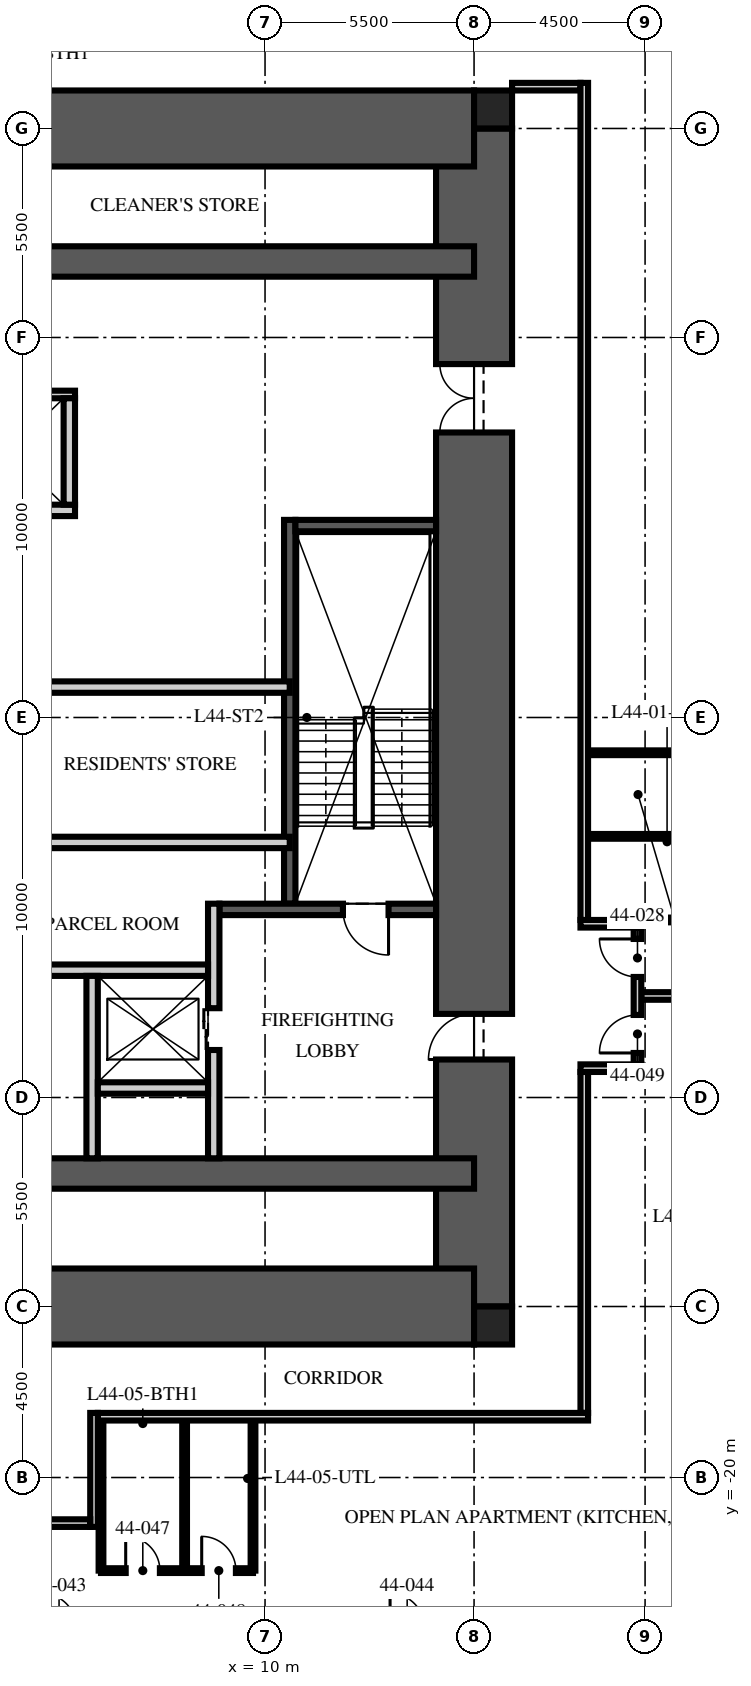
"""IFC4 building model, lengths in metres.
Left out: names, types, materials, properties, quantities, classifications, styles, units other than length and angle.
Written with IfcOpenShell. Run it as: python <this file> out.ifc"""

import sys

from ifc_helpers import new_model, si_unit, direction, frame, frame_2d, origin, origin_2d, place, context, subcontext, project, spatial, rectangle, extrude, element, fill, save


model = new_model("IFC4")
c1 = context("Model", 3, precision=1e-05, world=origin(), true_north=direction((0.0, 1.0)))
c2 = subcontext(c1, "Body", "Model", "MODEL_VIEW")
j1 = project(units=[si_unit("LENGTHUNIT", "METRE"), si_unit("PLANEANGLEUNIT", "RADIAN")], contexts=[c1])
p1 = place(None, origin())
s1 = spatial("IfcSite", under=j1, at=p1, CompositionType="ELEMENT")
p2 = place(p1, origin())
s2 = spatial("IfcBuilding", under=s1, at=p2, CompositionType="ELEMENT")
p3 = place(p2, frame((0.0, 0.0, 174.75)))
s3 = spatial("IfcBuildingStorey", under=s2, at=p3, CompositionType="ELEMENT", Elevation=174.75)
p4 = place(p3, frame((15.5, -15.5, -0.25), z_axis=(0.0, 0.0, 1.0), x_axis=(0.0, 1.0, 0.0)))
e1 = element("IfcWall", 1, at=p4, inside=s3, PredefinedType="SHEAR", context=c2, shape_type="SweptSolid", body=[
    extrude(rectangle(XDim=31.0, YDim=2.0, at=frame_2d((15.5, 0.0))), origin(), (0.0, 0.0, 1.0), 3.75),
])
p5 = place(p4, frame((6.5, 0.0, 0.25)))
e2 = element("IfcOpeningElement", 2, at=p5, cuts=e1, PredefinedType="OPENING", context=c2, shape_type="SweptSolid", body=[
    extrude(rectangle(XDim=1.2, YDim=2.1, at=frame_2d((0.6, 1.05))), frame((0.0, 1.01, 0.0), z_axis=(0.0, -1.0, 0.0), x_axis=(1.0, 0.0, 0.0)), (0.0, 0.0, 1.0), 2.02),
])
p6 = place(p4, frame((23.0, 0.0, 0.25)))
e3 = element("IfcOpeningElement", 3, at=p6, cuts=e1, PredefinedType="OPENING", context=c2, shape_type="SweptSolid", body=[
    extrude(rectangle(XDim=1.8, YDim=2.1, at=frame_2d((0.9, 1.05))), frame((0.0, 1.01, 0.0), z_axis=(0.0, -1.0, 0.0), x_axis=(1.0, 0.0, 0.0)), (0.0, 0.0, 1.0), 2.02),
])
p7 = place(p3, frame((-15.5, 15.5, -0.25), z_axis=(0.0, 0.0, 1.0), x_axis=(1.0, 0.0, 0.0)))
e4 = element("IfcWall", 4, at=p7, inside=s3, PredefinedType="SHEAR", context=c2, shape_type="SweptSolid", body=[
    extrude(rectangle(XDim=31.0, YDim=2.0, at=frame_2d((15.5, 0.0))), origin(), (0.0, 0.0, 1.0), 3.75),
])
p8 = place(p7, frame((5.0, 0.0, 0.25)))
e5 = element("IfcOpeningElement", 5, at=p8, cuts=e4, PredefinedType="OPENING", context=c2, shape_type="SweptSolid", body=[
    extrude(rectangle(XDim=1.0, YDim=2.1, at=frame_2d((0.5, 1.05))), frame((0.0, 1.01, 0.0), z_axis=(0.0, -1.0, 0.0), x_axis=(1.0, 0.0, 0.0)), (0.0, 0.0, 1.0), 2.02),
])
p9 = place(p3, frame((-15.5, -15.5, -0.25), z_axis=(0.0, 0.0, 1.0), x_axis=(1.0, 0.0, 0.0)))
e6 = element("IfcWall", 6, at=p9, inside=s3, PredefinedType="SHEAR", context=c2, shape_type="SweptSolid", body=[
    extrude(rectangle(XDim=31.0, YDim=2.0, at=frame_2d((15.5, 0.0))), origin(), (0.0, 0.0, 1.0), 3.75),
])
p10 = place(p9, frame((10.4, 0.0, 0.25)))
e7 = element("IfcOpeningElement", 7, at=p10, cuts=e6, PredefinedType="OPENING", context=c2, shape_type="SweptSolid", body=[
    extrude(rectangle(XDim=1.1, YDim=2.1, at=frame_2d((0.55, 1.05))), frame((0.0, 1.01, 0.0), z_axis=(0.0, -1.0, 0.0), x_axis=(1.0, 0.0, 0.0)), (0.0, 0.0, 1.0), 2.02),
])
p11 = place(p9, frame((13.5, 0.0, 0.25)))
e8 = element("IfcOpeningElement", 8, at=p11, cuts=e6, PredefinedType="OPENING", context=c2, shape_type="SweptSolid", body=[
    extrude(rectangle(XDim=1.1, YDim=2.1, at=frame_2d((0.55, 1.05))), frame((0.0, 1.01, 0.0), z_axis=(0.0, -1.0, 0.0), x_axis=(1.0, 0.0, 0.0)), (0.0, 0.0, 1.0), 2.02),
])
p12 = place(p9, frame((16.6, 0.0, 0.25)))
e9 = element("IfcOpeningElement", 9, at=p12, cuts=e6, PredefinedType="OPENING", context=c2, shape_type="SweptSolid", body=[
    extrude(rectangle(XDim=1.1, YDim=2.1, at=frame_2d((0.55, 1.05))), frame((0.0, 1.01, 0.0), z_axis=(0.0, -1.0, 0.0), x_axis=(1.0, 0.0, 0.0)), (0.0, 0.0, 1.0), 2.02),
])
for number, where, z_axis, x_axis in (
    (10, (-15.5, 12.0, -0.25), (0.0, 0.0, 1.0), (1.0, 0.0, 0.0)),
    (11, (-15.5, -12.0, -0.25), (0.0, 0.0, 1.0), (1.0, 0.0, 0.0)),
):
    element("IfcWall", number, at=place(p3, frame(where, z_axis=z_axis, x_axis=x_axis)), inside=s3, PredefinedType="SHEAR", context=c2, shape_type="SweptSolid", body=[
        extrude(rectangle(XDim=31.0, YDim=0.8, at=frame_2d((15.5, 0.0))), origin(), (0.0, 0.0, 1.0), 3.75),
    ])
for number, where, z_axis, x_axis in (
    (12, (16.0, 16.0, -0.25), (0.0, 0.0, 1.0), (1.0, 0.0, 0.0)),
    (13, (16.0, -16.0, -0.25), (0.0, 0.0, 1.0), (1.0, 0.0, 0.0)),
):
    element("IfcColumn", number, at=place(p3, frame(where, z_axis=z_axis, x_axis=x_axis)), inside=s3, PredefinedType="COLUMN", context=c2, shape_type="SweptSolid", body=[
        extrude(rectangle(XDim=1.0, YDim=1.0, at=origin_2d()), origin(), (0.0, 0.0, 1.0), 3.75),
    ])
p13 = place(p3, frame((10.65, -4.9, 0.0), z_axis=(0.0, 0.0, 1.0), x_axis=(0.0, 1.0, 0.0)))
e14 = element("IfcWall", 14, at=p13, inside=s3, PredefinedType="SOLIDWALL", context=c2, shape_type="SweptSolid", body=[
    extrude(rectangle(XDim=10.1, YDim=0.3, at=frame_2d((5.05, 0.0))), origin(), (0.0, 0.0, 1.0), 3.5),
])
p14 = place(p3, frame((14.5, -5.05, 0.0), z_axis=(0.0, 0.0, 1.0), x_axis=(-1.0, 0.0, 0.0)))
e15 = element("IfcWall", 15, at=p14, inside=s3, PredefinedType="SOLIDWALL", context=c2, shape_type="SweptSolid", body=[
    extrude(rectangle(XDim=5.7, YDim=0.3, at=frame_2d((2.85, 0.0))), origin(), (0.0, 0.0, 1.0), 3.5),
])
p15 = place(p14, frame((1.25, 0.0, 0.0)))
e16 = element("IfcOpeningElement", 16, at=p15, cuts=e15, PredefinedType="OPENING", context=c2, shape_type="SweptSolid", body=[
    extrude(rectangle(XDim=1.2, YDim=2.1, at=frame_2d((0.6, 1.05))), frame((0.0, 0.16, 0.0), z_axis=(0.0, -1.0, 0.0), x_axis=(1.0, 0.0, 0.0)), (0.0, 0.0, 1.0), 0.32),
])
p16 = place(p3, frame((14.5, 5.05, 0.0), z_axis=(0.0, 0.0, 1.0), x_axis=(-1.0, 0.0, 0.0)))
e17 = element("IfcWall", 17, at=p16, inside=s3, PredefinedType="SOLIDWALL", context=c2, shape_type="SweptSolid", body=[
    extrude(rectangle(XDim=3.7, YDim=0.3, at=frame_2d((1.85, 0.0))), origin(), (0.0, 0.0, 1.0), 3.5),
])
p17 = place(p3, frame((8.65, -11.6, 0.0), z_axis=(0.0, 0.0, 1.0), x_axis=(0.0, 1.0, 0.0)))
e18 = element("IfcWall", 18, at=p17, inside=s3, PredefinedType="PARTITIONING", context=c2, shape_type="SweptSolid", body=[
    extrude(rectangle(XDim=6.7, YDim=0.3, at=frame_2d((3.35, 0.0))), origin(), (0.0, 0.0, 1.0), 3.5),
])
p18 = place(p17, frame((2.85, 0.0, 0.0)))
e19 = element("IfcOpeningElement", 19, at=p18, cuts=e18, PredefinedType="OPENING", context=c2, shape_type="SweptSolid", body=[
    extrude(rectangle(XDim=1.1, YDim=2.1, at=frame_2d((0.55, 1.05))), frame((0.0, 0.16, 0.0), z_axis=(0.0, -1.0, 0.0), x_axis=(1.0, 0.0, 0.0)), (0.0, 0.0, 1.0), 0.32),
])
p19 = place(p3, frame((-8.5, -6.65, 0.0), z_axis=(0.0, 0.0, 1.0), x_axis=(1.0, 0.0, 0.0)))
e20 = element("IfcWall", 20, at=p19, inside=s3, PredefinedType="PARTITIONING", context=c2, shape_type="SweptSolid", body=[
    extrude(rectangle(XDim=17.0, YDim=0.3, at=frame_2d((8.5, 0.0))), origin(), (0.0, 0.0, 1.0), 3.5),
])
p20 = place(p19, frame((7.8, 0.0, 0.0)))
e21 = element("IfcOpeningElement", 21, at=p20, cuts=e20, PredefinedType="OPENING", context=c2, shape_type="SweptSolid", body=[
    extrude(rectangle(XDim=1.3, YDim=2.4, at=frame_2d((0.65, 1.2))), frame((0.0, 0.16, 0.0), z_axis=(0.0, -1.0, 0.0), x_axis=(1.0, 0.0, 0.0)), (0.0, 0.0, 1.0), 0.32),
])
p21 = place(p19, frame((5.65, 0.0, 0.0)))
e22 = element("IfcOpeningElement", 22, at=p21, cuts=e20, PredefinedType="OPENING", context=c2, shape_type="SweptSolid", body=[
    extrude(rectangle(XDim=0.9, YDim=2.1, at=frame_2d((0.45, 1.05))), frame((0.0, 0.16, 0.0), z_axis=(0.0, -1.0, 0.0), x_axis=(1.0, 0.0, 0.0)), (0.0, 0.0, 1.0), 0.32),
])
p22 = place(p19, frame((10.4, 0.0, 0.0)))
e23 = element("IfcOpeningElement", 23, at=p22, cuts=e20, PredefinedType="OPENING", context=c2, shape_type="SweptSolid", body=[
    extrude(rectangle(XDim=0.9, YDim=2.1, at=frame_2d((0.45, 1.05))), frame((0.0, 0.16, 0.0), z_axis=(0.0, -1.0, 0.0), x_axis=(1.0, 0.0, 0.0)), (0.0, 0.0, 1.0), 0.32),
])
p23 = place(p3, frame((5.45, -11.6, 0.0), z_axis=(0.0, 0.0, 1.0), x_axis=(0.0, 1.0, 0.0)))
e24 = element("IfcWall", 24, at=p23, inside=s3, PredefinedType="PARTITIONING", context=c2, shape_type="SweptSolid", body=[
    extrude(rectangle(XDim=4.8, YDim=0.3, at=frame_2d((2.4, 0.0))), origin(), (0.0, 0.0, 1.0), 3.5),
])
p24 = place(p3, frame((5.6, -9.75, 0.0), z_axis=(0.0, 0.0, 1.0), x_axis=(1.0, 0.0, 0.0)))
e25 = element("IfcWall", 25, at=p24, inside=s3, PredefinedType="PARTITIONING", context=c2, shape_type="SweptSolid", body=[
    extrude(rectangle(XDim=2.9, YDim=0.3, at=frame_2d((1.45, 0.0))), origin(), (0.0, 0.0, 1.0), 3.5),
])
p25 = place(p3, frame((-4.7, 5.45, 0.0), z_axis=(0.0, 0.0, 1.0), x_axis=(1.0, 0.0, 0.0)))
e26 = element("IfcWall", 26, at=p25, inside=s3, PredefinedType="PARTITIONING", context=c2, shape_type="SweptSolid", body=[
    extrude(rectangle(XDim=9.7, YDim=0.3, at=frame_2d((4.85, 0.0))), origin(), (0.0, 0.0, 1.0), 3.5),
])
p26 = place(p3, frame((-4.7, 8.5, 0.0), z_axis=(0.0, 0.0, 1.0), x_axis=(1.0, 0.0, 0.0)))
e27 = element("IfcWall", 27, at=p26, inside=s3, PredefinedType="PARTITIONING", context=c2, shape_type="SweptSolid", body=[
    extrude(rectangle(XDim=9.7, YDim=0.2, at=frame_2d((4.85, 0.0))), origin(), (0.0, 0.0, 1.0), 3.5),
])
p27 = place(p3, frame((4.85, 5.6, 0.0), z_axis=(0.0, 0.0, 1.0), x_axis=(0.0, 1.0, 0.0)))
e28 = element("IfcWall", 28, at=p27, inside=s3, PredefinedType="PARTITIONING", context=c2, shape_type="SweptSolid", body=[
    extrude(rectangle(XDim=2.8, YDim=0.3, at=frame_2d((1.4, 0.0))), origin(), (0.0, 0.0, 1.0), 3.5),
])
p28 = place(p3, frame((-10.65, 0.8, 0.0), z_axis=(0.0, 0.0, 1.0), x_axis=(1.0, 0.0, 0.0)))
e29 = element("IfcWall", 29, at=p28, inside=s3, PredefinedType="PARTITIONING", context=c2, shape_type="SweptSolid", body=[
    extrude(rectangle(XDim=21.3, YDim=0.3, at=frame_2d((10.65, 0.0))), origin(), (0.0, 0.0, 1.0), 3.5),
])
p29 = place(p28, frame((10.05, 0.0, 0.0)))
e30 = element("IfcOpeningElement", 30, at=p29, cuts=e29, PredefinedType="OPENING", context=c2, shape_type="SweptSolid", body=[
    extrude(rectangle(XDim=1.2, YDim=2.1, at=frame_2d((0.6, 1.05))), frame((0.0, 0.16, 0.0), z_axis=(0.0, -1.0, 0.0), x_axis=(1.0, 0.0, 0.0)), (0.0, 0.0, 1.0), 0.32),
])
p30 = place(p28, frame((1.74, 0.0, 0.0)))
e31 = element("IfcOpeningElement", 31, at=p30, cuts=e29, PredefinedType="OPENING", context=c2, shape_type="SweptSolid", body=[
    extrude(rectangle(XDim=0.9, YDim=2.1, at=frame_2d((0.45, 1.05))), frame((0.0, 0.16, 0.0), z_axis=(0.0, -1.0, 0.0), x_axis=(1.0, 0.0, 0.0)), (0.0, 0.0, 1.0), 0.32),
])
p31 = place(p3, frame((10.65, -3.288, 0.0), z_axis=(0.0, 0.0, 1.0), x_axis=(-1.0, 0.0, 0.0)))
e32 = element("IfcWall", 32, at=p31, inside=s3, PredefinedType="PARTITIONING", context=c2, shape_type="SweptSolid", body=[
    extrude(rectangle(XDim=7.35, YDim=0.3, at=frame_2d((3.675, 0.0))), origin(), (0.0, 0.0, 1.0), 3.5),
])
p32 = place(p3, frame((16.5, 16.6, 0.0), z_axis=(0.0, 0.0, 1.0), x_axis=(1.0, 0.0, 0.0)))
e33 = element("IfcWall", 33, at=p32, inside=s3, PredefinedType="PARTITIONING", context=c2, shape_type="SweptSolid", body=[
    extrude(rectangle(XDim=1.8, YDim=0.2, at=frame_2d((0.9, 0.0))), origin(), (0.0, 0.0, 1.0), 2.3),
])
p33 = place(p3, frame((19.9, -7.328, 0.0), z_axis=(0.0, 0.0, 1.0), x_axis=(1.0, 0.0, 0.0)))
e34 = element("IfcWall", 34, at=p33, inside=s3, PredefinedType="PARTITIONING", context=c2, shape_type="SweptSolid", body=[
    extrude(rectangle(XDim=8.25, YDim=0.2, at=frame_2d((4.125, 0.0))), origin(), (0.0, 0.0, 1.0), 2.81),
])
p34 = place(p3, frame((19.97, -5.328, 0.0), z_axis=(0.0, 0.0, 1.0), x_axis=(1.0, 0.0, 0.0)))
e35 = element("IfcWall", 35, at=p34, inside=s3, PredefinedType="PARTITIONING", context=c2, shape_type="SweptSolid", body=[
    extrude(rectangle(XDim=2.06, YDim=0.125, at=frame_2d((1.03, 0.0))), origin(), (0.0, 0.0, 1.0), 3.5),
])
for number, where, z_axis, x_axis in (
    (36, (18.5, -3.128, 0.0), (0.0, 0.0, 1.0), (1.0, 0.0, 0.0)),
    (37, (18.5, -0.928, 0.0), (0.0, 0.0, 1.0), (1.0, 0.0, 0.0)),
):
    element("IfcWall", number, at=place(p3, frame(where, z_axis=z_axis, x_axis=x_axis)), inside=s3, PredefinedType="PARTITIONING", context=c2, shape_type="SweptSolid", body=[
        extrude(rectangle(XDim=3.53, YDim=0.125, at=frame_2d((1.765, 0.0))), origin(), (0.0, 0.0, 1.0), 3.5),
    ])
p35 = place(p3, frame((5.684, -22.45, 0.0), z_axis=(0.0, 0.0, 1.0), x_axis=(1.0, 0.0, 0.0)))
e38 = element("IfcWall", 38, at=p35, inside=s3, PredefinedType="PARTITIONING", context=c2, shape_type="SweptSolid", body=[
    extrude(rectangle(XDim=4.0, YDim=0.125, at=frame_2d((2.0, 0.0))), origin(), (0.0, 0.0, 1.0), 2.7),
])
p36 = place(p35, frame((0.65, 0.0, 0.0)))
e39 = element("IfcOpeningElement", 39, at=p36, cuts=e38, PredefinedType="OPENING", context=c2, shape_type="SweptSolid", body=[
    extrude(rectangle(XDim=0.9, YDim=2.1, at=frame_2d((0.45, 1.05))), frame((0.0, 0.073, 0.0), z_axis=(0.0, -1.0, 0.0), x_axis=(1.0, 0.0, 0.0)), (0.0, 0.0, 1.0), 0.145),
])
p37 = place(p35, frame((2.65, 0.0, 0.0)))
e40 = element("IfcOpeningElement", 40, at=p37, cuts=e38, PredefinedType="OPENING", context=c2, shape_type="SweptSolid", body=[
    extrude(rectangle(XDim=0.9, YDim=2.1, at=frame_2d((0.45, 1.05))), frame((0.0, 0.073, 0.0), z_axis=(0.0, -1.0, 0.0), x_axis=(1.0, 0.0, 0.0)), (0.0, 0.0, 1.0), 0.145),
])
for number, where, z_axis, x_axis in (
    (41, (5.684, -18.5, 0.0), (0.0, 0.0, 1.0), (0.0, -1.0, 0.0)),
    (42, (7.884, -18.5, 0.0), (0.0, 0.0, 1.0), (0.0, -1.0, 0.0)),
    (43, (9.684, -18.5, 0.0), (0.0, 0.0, 1.0), (0.0, -1.0, 0.0)),
):
    element("IfcWall", number, at=place(p3, frame(where, z_axis=z_axis, x_axis=x_axis)), inside=s3, PredefinedType="PARTITIONING", context=c2, shape_type="SweptSolid", body=[
        extrude(rectangle(XDim=3.95, YDim=0.125, at=frame_2d((1.975, 0.0))), origin(), (0.0, 0.0, 1.0), 3.5),
    ])
p38 = place(p3, frame((18.4, -18.3, 0.0), z_axis=(0.0, 0.0, 1.0), x_axis=(0.0, 1.0, 0.0)))
e44 = element("IfcWall", 44, at=p38, inside=s3, PredefinedType="PARTITIONING", context=c2, shape_type="SweptSolid", body=[
    extrude(rectangle(XDim=8.972, YDim=0.2, at=frame_2d((4.486, 0.0))), origin(), (0.0, 0.0, 1.0), 2.3),
])
p39 = place(p3, frame((18.3, -9.228, 0.0), z_axis=(0.0, 0.0, 1.0), x_axis=(1.0, 0.0, 0.0)))
e45 = element("IfcWall", 45, at=p39, inside=s3, PredefinedType="PARTITIONING", context=c2, shape_type="SweptSolid", body=[
    extrude(rectangle(XDim=1.6, YDim=0.2, at=frame_2d((0.8, 0.0))), origin(), (0.0, 0.0, 1.0), 2.7),
])
p40 = place(p3, frame((18.3, -5.428, 0.0), z_axis=(0.0, 0.0, 1.0), x_axis=(1.0, 0.0, 0.0)))
e46 = element("IfcWall", 46, at=p40, inside=s3, PredefinedType="PARTITIONING", context=c2, shape_type="SweptSolid", body=[
    extrude(rectangle(XDim=1.6, YDim=0.2, at=frame_2d((0.8, 0.0))), origin(), (0.0, 0.0, 1.0), 3.5),
])
p41 = place(p3, frame((19.8, -9.128, 0.0), z_axis=(0.0, 0.0, 1.0), x_axis=(0.0, 1.0, 0.0)))
e47 = element("IfcWall", 47, at=p41, inside=s3, PredefinedType="PARTITIONING", context=c2, shape_type="SweptSolid", body=[
    extrude(rectangle(XDim=3.6, YDim=0.2, at=frame_2d((1.8, 0.0))), origin(), (0.0, 0.0, 1.0), 2.7),
])
p42 = place(p41, frame((2.3, 0.0, 0.0)))
e48 = element("IfcOpeningElement", 48, at=p42, cuts=e47, PredefinedType="OPENING", context=c2, shape_type="SweptSolid", body=[
    extrude(rectangle(XDim=1.0, YDim=2.2, at=frame_2d((0.5, 1.1))), frame((0.0, 0.11, 0.0), z_axis=(0.0, -1.0, 0.0), x_axis=(1.0, 0.0, 0.0)), (0.0, 0.0, 1.0), 0.22),
])
p43 = place(p41, frame((0.3, 0.0, 0.0)))
e49 = element("IfcOpeningElement", 49, at=p43, cuts=e47, PredefinedType="OPENING", context=c2, shape_type="SweptSolid", body=[
    extrude(rectangle(XDim=1.0, YDim=2.2, at=frame_2d((0.5, 1.1))), frame((0.0, 0.11, 0.0), z_axis=(0.0, -1.0, 0.0), x_axis=(1.0, 0.0, 0.0)), (0.0, 0.0, 1.0), 0.22),
])
p44 = place(p3, frame((18.4, -5.328, 0.0), z_axis=(0.0, 0.0, 1.0), x_axis=(0.0, 1.0, 0.0)))
e50 = element("IfcWall", 50, at=p44, inside=s3, PredefinedType="PARTITIONING", context=c2, shape_type="SweptSolid", body=[
    extrude(rectangle(XDim=22.028, YDim=0.2, at=frame_2d((11.014, 0.0))), origin(), (0.0, 0.0, 1.0), 2.7),
])
p45 = place(p3, frame((18.5, -18.4, 0.0), z_axis=(0.0, 0.0, 1.0), x_axis=(-1.0, 0.0, 0.0)))
e51 = element("IfcWall", 51, at=p45, inside=s3, PredefinedType="PARTITIONING", context=c2, shape_type="SweptSolid", body=[
    extrude(rectangle(XDim=12.9, YDim=0.2, at=frame_2d((6.45, 0.0))), origin(), (0.0, 0.0, 1.0), 2.3),
])
p46 = place(p3, frame((5.5, -18.3, 0.0), z_axis=(0.0, 0.0, 1.0), x_axis=(0.0, -1.0, 0.0)))
e52 = element("IfcWall", 52, at=p46, inside=s3, PredefinedType="PARTITIONING", context=c2, shape_type="SweptSolid", body=[
    extrude(rectangle(XDim=3.0, YDim=0.2, at=frame_2d((1.5, 0.0))), origin(), (0.0, 0.0, 1.0), 3.5),
])
p47 = place(p3, frame((5.4, -21.2, 0.0), z_axis=(0.0, 0.0, 1.0), x_axis=(-1.0, 0.0, 0.0)))
e53 = element("IfcWall", 53, at=p47, inside=s3, PredefinedType="PARTITIONING", context=c2, shape_type="SweptSolid", body=[
    extrude(rectangle(XDim=13.8, YDim=0.2, at=frame_2d((6.9, 0.0))), origin(), (0.0, 0.0, 1.0), 2.7),
])
p48 = place(p15, origin())
e54 = element("IfcDoor", 54, at=p48, inside=s3, OperationType="SINGLE_SWING_LEFT", PredefinedType="DOOR", context=c2, shape_type="SweptSolid", body=[
    extrude(rectangle(XDim=1.2, YDim=2.1, at=frame_2d((0.6, 1.05))), frame((0.0, 0.025, 0.0), z_axis=(0.0, -1.0, 0.0), x_axis=(1.0, 0.0, 0.0)), (0.0, 0.0, 1.0), 0.05),
])
fill(e16, e54)
p49 = place(p5, origin())
e55 = element("IfcDoor", 55, at=p49, inside=s3, OperationType="SINGLE_SWING_LEFT", PredefinedType="DOOR", context=c2, shape_type="SweptSolid", body=[
    extrude(rectangle(XDim=1.2, YDim=2.1, at=frame_2d((0.6, 1.05))), frame((0.0, 0.025, 0.0), z_axis=(0.0, -1.0, 0.0), x_axis=(1.0, 0.0, 0.0)), (0.0, 0.0, 1.0), 0.05),
])
fill(e2, e55)
p50 = place(p6, origin())
e56 = element("IfcDoor", 56, at=p50, inside=s3, OperationType="DOUBLE_DOOR_SINGLE_SWING", PredefinedType="DOOR", context=c2, shape_type="SweptSolid", body=[
    extrude(rectangle(XDim=1.8, YDim=2.1, at=frame_2d((0.9, 1.05))), frame((0.0, 0.025, 0.0), z_axis=(0.0, -1.0, 0.0), x_axis=(1.0, 0.0, 0.0)), (0.0, 0.0, 1.0), 0.05),
])
fill(e3, e56)
p51 = place(p18, origin())
e57 = element("IfcDoor", 57, at=p51, inside=s3, OperationType="DOUBLE_DOOR_SLIDING", PredefinedType="DOOR", context=c2, shape_type="SweptSolid", body=[
    extrude(rectangle(XDim=1.1, YDim=2.1, at=frame_2d((0.55, 1.05))), frame((0.0, 0.025, 0.0), z_axis=(0.0, -1.0, 0.0), x_axis=(1.0, 0.0, 0.0)), (0.0, 0.0, 1.0), 0.05),
])
fill(e19, e57)
p52 = place(p42, origin())
e58 = element("IfcDoor", 58, at=p52, inside=s3, OperationType="SINGLE_SWING_RIGHT", PredefinedType="DOOR", context=c2, shape_type="SweptSolid", body=[
    extrude(rectangle(XDim=1.0, YDim=2.2, at=frame_2d((0.5, 1.1))), frame((0.0, 0.025, 0.0), z_axis=(0.0, -1.0, 0.0), x_axis=(1.0, 0.0, 0.0)), (0.0, 0.0, 1.0), 0.05),
])
fill(e48, e58)
p53 = place(p36, origin())
e59 = element("IfcDoor", 59, at=p53, inside=s3, OperationType="SINGLE_SWING_LEFT", PredefinedType="DOOR", context=c2, shape_type="SweptSolid", body=[
    extrude(rectangle(XDim=0.9, YDim=2.1, at=frame_2d((0.45, 1.05))), frame((0.0, 0.025, 0.0), z_axis=(0.0, -1.0, 0.0), x_axis=(1.0, 0.0, 0.0)), (0.0, 0.0, 1.0), 0.05),
])
fill(e39, e59)
p54 = place(p37, origin())
e60 = element("IfcDoor", 60, at=p54, inside=s3, OperationType="SINGLE_SWING_LEFT", PredefinedType="DOOR", context=c2, shape_type="SweptSolid", body=[
    extrude(rectangle(XDim=0.9, YDim=2.1, at=frame_2d((0.45, 1.05))), frame((0.0, 0.025, 0.0), z_axis=(0.0, -1.0, 0.0), x_axis=(1.0, 0.0, 0.0)), (0.0, 0.0, 1.0), 0.05),
])
fill(e40, e60)
p55 = place(p43, origin())
e61 = element("IfcDoor", 61, at=p55, inside=s3, OperationType="SINGLE_SWING_LEFT", PredefinedType="DOOR", context=c2, shape_type="SweptSolid", body=[
    extrude(rectangle(XDim=1.0, YDim=2.2, at=frame_2d((0.5, 1.1))), frame((0.0, 0.025, 0.0), z_axis=(0.0, -1.0, 0.0), x_axis=(1.0, 0.0, 0.0)), (0.0, 0.0, 1.0), 0.05),
])
fill(e49, e61)
save(model, sys.argv[1])
